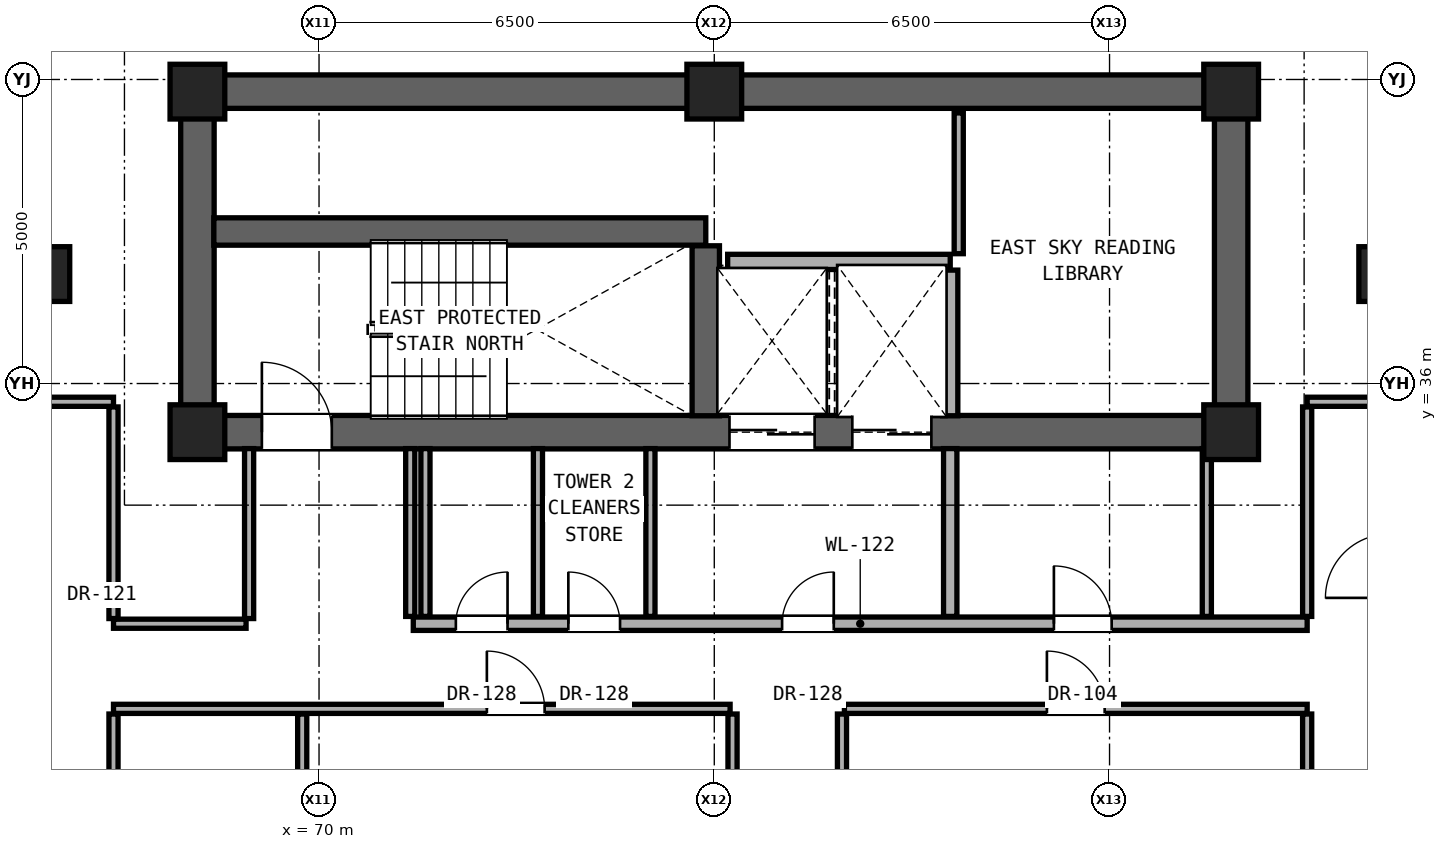
"""IFC4 building model, lengths in metres.
Left out: names, types, materials, properties, quantities, classifications, styles, units other than length and angle.
Written with IfcOpenShell. Run it as: python <this file> out.ifc"""

import sys

from ifc_helpers import new_model, si_unit, direction, frame, frame_2d, origin, origin_2d, place, context, subcontext, project, spatial, rectangle, extrude, element, fill, save


model = new_model("IFC4")
c1 = context("Model", 3, precision=1e-05, world=origin(), true_north=direction((0.0, 1.0)))
c2 = subcontext(c1, "Body", "Model", "MODEL_VIEW")
j1 = project(units=[si_unit("LENGTHUNIT", "METRE"), si_unit("PLANEANGLEUNIT", "RADIAN")], contexts=[c1])
p1 = place(None, origin())
s1 = spatial("IfcSite", under=j1, at=p1, CompositionType="ELEMENT")
p2 = place(p1, origin())
s2 = spatial("IfcBuilding", under=s1, at=p2, CompositionType="ELEMENT")
p3 = place(p2, frame((0.0, 0.0, 190.15)))
s3 = spatial("IfcBuildingStorey", under=s2, at=p3, CompositionType="ELEMENT", Elevation=190.15)
for number, where, z_axis, x_axis in (
    (1, (68.0, 35.2, 0.0), (0.0, 0.0, 1.0), (1.0, 0.0, 0.0)),
    (2, (85.0, 35.2, 0.0), (0.0, 0.0, 1.0), (1.0, 0.0, 0.0)),
    (3, (68.0, 40.8, 0.0), (0.0, 0.0, 1.0), (1.0, 0.0, 0.0)),
    (4, (76.5, 40.8, 0.0), (0.0, 0.0, 1.0), (1.0, 0.0, 0.0)),
    (5, (85.0, 40.8, 0.0), (0.0, 0.0, 1.0), (1.0, 0.0, 0.0)),
):
    element("IfcColumn", number, at=place(p3, frame(where, z_axis=z_axis, x_axis=x_axis)), inside=s3, PredefinedType="COLUMN", context=c2, shape_type="SweptSolid", body=[
        extrude(rectangle(XDim=0.9, YDim=0.9, at=origin_2d()), origin(), (0.0, 0.0, 1.0), 3.25),
    ])
for number, where, z_axis, x_axis in (
    (6, (65.6, 37.8, 0.0), (0.0, 0.0, 1.0), (1.0, 0.0, 0.0)),
    (7, (87.4, 37.8, 0.0), (0.0, 0.0, 1.0), (1.0, 0.0, 0.0)),
):
    element("IfcColumn", number, at=place(p3, frame(where, z_axis=z_axis, x_axis=x_axis)), inside=s3, PredefinedType="PILASTER", context=c2, shape_type="SweptSolid", body=[
        extrude(rectangle(XDim=0.6, YDim=0.9, at=origin_2d()), origin(), (0.0, 0.0, 1.0), 3.25),
    ])
p4 = place(p3, frame((68.0, 40.8, 0.0), z_axis=(0.0, 0.0, 1.0), x_axis=(1.0, 0.0, 0.0)))
e8 = element("IfcWall", 8, at=p4, inside=s3, PredefinedType="SHEAR", context=c2, shape_type="SweptSolid", body=[
    extrude(rectangle(XDim=17.0, YDim=0.55, at=frame_2d((8.5, 0.0))), origin(), (0.0, 0.0, 1.0), 3.05),
])
for number, where, z_axis, x_axis in (
    (9, (68.0, 35.2, 0.0), (0.0, 0.0, 1.0), (0.0, 1.0, 0.0)),
    (10, (85.0, 35.2, 0.0), (0.0, 0.0, 1.0), (0.0, 1.0, 0.0)),
):
    element("IfcWall", number, at=place(p3, frame(where, z_axis=z_axis, x_axis=x_axis)), inside=s3, PredefinedType="SHEAR", context=c2, shape_type="SweptSolid", body=[
        extrude(rectangle(XDim=5.6, YDim=0.55, at=frame_2d((2.8, 0.0))), origin(), (0.0, 0.0, 1.0), 3.05),
    ])
p5 = place(p3, frame((68.0, 35.2, 0.0), z_axis=(0.0, 0.0, 1.0), x_axis=(1.0, 0.0, 0.0)))
e11 = element("IfcWall", 11, at=p5, inside=s3, PredefinedType="SHEAR", context=c2, shape_type="SweptSolid", body=[
    extrude(rectangle(XDim=17.0, YDim=0.55, at=frame_2d((8.5, 0.0))), origin(), (0.0, 0.0, 1.0), 3.05),
])
p6 = place(p5, frame((1.06, 0.0, 0.0)))
e12 = element("IfcOpeningElement", 12, at=p6, cuts=e11, PredefinedType="OPENING", context=c2, shape_type="SweptSolid", body=[
    extrude(rectangle(XDim=1.15, YDim=2.2, at=frame_2d((0.575, 1.1))), frame((0.0, 0.285, 0.0), z_axis=(0.0, -1.0, 0.0), x_axis=(1.0, 0.0, 0.0)), (0.0, 0.0, 1.0), 0.57),
])
p7 = place(p5, frame((8.75, 0.0, 0.0)))
e13 = element("IfcOpeningElement", 13, at=p7, cuts=e11, PredefinedType="OPENING", context=c2, shape_type="SweptSolid", body=[
    extrude(rectangle(XDim=1.4, YDim=2.35, at=frame_2d((0.7, 1.175))), frame((0.0, 0.285, 0.0), z_axis=(0.0, -1.0, 0.0), x_axis=(1.0, 0.0, 0.0)), (0.0, 0.0, 1.0), 0.57),
])
p8 = place(p5, frame((10.77, 0.0, 0.0)))
e14 = element("IfcOpeningElement", 14, at=p8, cuts=e11, PredefinedType="OPENING", context=c2, shape_type="SweptSolid", body=[
    extrude(rectangle(XDim=1.3, YDim=2.3, at=frame_2d((0.65, 1.15))), frame((0.0, 0.285, 0.0), z_axis=(0.0, -1.0, 0.0), x_axis=(1.0, 0.0, 0.0)), (0.0, 0.0, 1.0), 0.57),
])
p9 = place(p3, frame((66.62, 30.65, 0.0), z_axis=(0.0, 0.0, 1.0), x_axis=(1.0, 0.0, 0.0)))
e15 = element("IfcWall", 15, at=p9, inside=s3, PredefinedType="PARTITIONING", context=c2, shape_type="SweptSolid", body=[
    extrude(rectangle(XDim=10.14, YDim=0.15, at=frame_2d((5.07, 0.0))), origin(), (0.0, 0.0, 1.0), 2.186),
])
p10 = place(p9, frame((6.14, 0.0, 0.0)))
e16 = element("IfcOpeningElement", 16, at=p10, cuts=e15, PredefinedType="OPENING", context=c2, shape_type="SweptSolid", body=[
    extrude(rectangle(XDim=0.95, YDim=2.15, at=frame_2d((0.475, 1.075))), frame((0.0, 0.085, 0.0), z_axis=(0.0, -1.0, 0.0), x_axis=(1.0, 0.0, 0.0)), (0.0, 0.0, 1.0), 0.17),
])
p11 = place(p3, frame((78.64, 30.65, 0.0), z_axis=(0.0, 0.0, 1.0), x_axis=(1.0, 0.0, 0.0)))
e17 = element("IfcWall", 17, at=p11, inside=s3, PredefinedType="PARTITIONING", context=c2, shape_type="SweptSolid", body=[
    extrude(rectangle(XDim=7.61, YDim=0.15, at=frame_2d((3.805, 0.0))), origin(), (0.0, 0.0, 1.0), 2.186),
])
p12 = place(p11, frame((3.33, 0.0, 0.0)))
e18 = element("IfcOpeningElement", 18, at=p12, cuts=e17, PredefinedType="OPENING", context=c2, shape_type="SweptSolid", body=[
    extrude(rectangle(XDim=0.95, YDim=2.15, at=frame_2d((0.475, 1.075))), frame((0.0, 0.085, 0.0), z_axis=(0.0, -1.0, 0.0), x_axis=(1.0, 0.0, 0.0)), (0.0, 0.0, 1.0), 0.17),
])
p13 = place(p3, frame((66.62, 32.05, 0.0), z_axis=(0.0, 0.0, 1.0), x_axis=(1.0, 0.0, 0.0)))
e19 = element("IfcWall", 19, at=p13, inside=s3, PredefinedType="PARTITIONING", context=c2, shape_type="SweptSolid", body=[
    extrude(rectangle(XDim=2.18, YDim=0.15, at=frame_2d((1.09, 0.0))), origin(), (0.0, 0.0, 1.0), 2.186),
])
p14 = place(p3, frame((71.55, 32.05, 0.0), z_axis=(0.0, 0.0, 1.0), x_axis=(1.0, 0.0, 0.0)))
e20 = element("IfcWall", 20, at=p14, inside=s3, PredefinedType="SOLIDWALL", context=c2, shape_type="SweptSolid", body=[
    extrude(rectangle(XDim=14.7, YDim=0.22, at=frame_2d((7.35, 0.0))), origin(), (0.0, 0.0, 1.0), 2.186),
])
p15 = place(p14, frame((6.065, 0.0, 0.0)))
e21 = element("IfcOpeningElement", 21, at=p15, cuts=e20, PredefinedType="OPENING", context=c2, shape_type="SweptSolid", body=[
    extrude(rectangle(XDim=0.85, YDim=2.01, at=frame_2d((0.425, 1.005))), frame((0.0, 0.12, 0.0), z_axis=(0.0, -1.0, 0.0), x_axis=(1.0, 0.0, 0.0)), (0.0, 0.0, 1.0), 0.24),
])
p16 = place(p14, frame((10.535, 0.0, 0.0)))
e22 = element("IfcOpeningElement", 22, at=p16, cuts=e20, PredefinedType="OPENING", context=c2, shape_type="SweptSolid", body=[
    extrude(rectangle(XDim=0.95, YDim=2.15, at=frame_2d((0.475, 1.075))), frame((0.0, 0.12, 0.0), z_axis=(0.0, -1.0, 0.0), x_axis=(1.0, 0.0, 0.0)), (0.0, 0.0, 1.0), 0.24),
])
p17 = place(p14, frame((0.7, 0.0, 0.0)))
e23 = element("IfcOpeningElement", 23, at=p17, cuts=e20, PredefinedType="OPENING", context=c2, shape_type="SweptSolid", body=[
    extrude(rectangle(XDim=0.85, YDim=2.01, at=frame_2d((0.425, 1.005))), frame((0.0, 0.12, 0.0), z_axis=(0.0, -1.0, 0.0), x_axis=(1.0, 0.0, 0.0)), (0.0, 0.0, 1.0), 0.24),
])
p18 = place(p14, frame((2.55, 0.0, 0.0)))
e24 = element("IfcOpeningElement", 24, at=p18, cuts=e20, PredefinedType="OPENING", context=c2, shape_type="SweptSolid", body=[
    extrude(rectangle(XDim=0.85, YDim=2.01, at=frame_2d((0.425, 1.005))), frame((0.0, 0.12, 0.0), z_axis=(0.0, -1.0, 0.0), x_axis=(1.0, 0.0, 0.0)), (0.0, 0.0, 1.0), 0.24),
])
p19 = place(p3, frame((65.25, 35.7, 0.0), z_axis=(0.0, 0.0, 1.0), x_axis=(1.0, 0.0, 0.0)))
e25 = element("IfcWall", 25, at=p19, inside=s3, PredefinedType="PARTITIONING", context=c2, shape_type="SweptSolid", body=[
    extrude(rectangle(XDim=1.37, YDim=0.15, at=frame_2d((0.685, 0.0))), origin(), (0.0, 0.0, 1.0), 3.05),
])
p20 = place(p3, frame((86.25, 35.7, 0.0), z_axis=(0.0, 0.0, 1.0), x_axis=(1.0, 0.0, 0.0)))
e26 = element("IfcWall", 26, at=p20, inside=s3, PredefinedType="PARTITIONING", context=c2, shape_type="SweptSolid", body=[
    extrude(rectangle(XDim=1.35, YDim=0.15, at=frame_2d((0.675, 0.0))), origin(), (0.0, 0.0, 1.0), 3.05),
])
p21 = place(p3, frame((76.72, 38.0, 0.0), z_axis=(0.0, 0.0, 1.0), x_axis=(1.0, 0.0, 0.0)))
e27 = element("IfcWall", 27, at=p21, inside=s3, PredefinedType="SOLIDWALL", context=c2, shape_type="SweptSolid", body=[
    extrude(rectangle(XDim=3.66, YDim=0.25, at=frame_2d((1.83, 0.0))), origin(), (0.0, 0.0, 1.0), 3.05),
])
p22 = place(p3, frame((68.27, 38.5, 0.0), z_axis=(0.0, 0.0, 1.0), x_axis=(1.0, 0.0, 0.0)))
e28 = element("IfcWall", 28, at=p22, inside=s3, PredefinedType="SHEAR", context=c2, shape_type="SweptSolid", body=[
    extrude(rectangle(XDim=8.09, YDim=0.45, at=frame_2d((4.045, 0.0))), origin(), (0.0, 0.0, 1.0), 3.05),
])
p23 = place(p3, frame((66.62, 24.935, 0.0), z_axis=(0.0, 0.0, 1.0), x_axis=(0.0, 1.0, 0.0)))
e29 = element("IfcWall", 29, at=p23, inside=s3, PredefinedType="PARTITIONING", context=c2, shape_type="SweptSolid", body=[
    extrude(rectangle(XDim=5.63, YDim=0.15, at=frame_2d((2.815, 0.0))), origin(), (0.0, 0.0, 1.0), 2.346),
])
p24 = place(p23, frame((2.34, 0.0, 0.0)))
e30 = element("IfcOpeningElement", 30, at=p24, cuts=e29, PredefinedType="OPENING", context=c2, shape_type="SweptSolid", body=[
    extrude(rectangle(XDim=0.95, YDim=2.15, at=frame_2d((0.475, 1.075))), frame((0.0, 0.085, 0.0), z_axis=(0.0, -1.0, 0.0), x_axis=(1.0, 0.0, 0.0)), (0.0, 0.0, 1.0), 0.17),
])
p25 = place(p3, frame((66.62, 32.135, 0.0), z_axis=(0.0, 0.0, 1.0), x_axis=(0.0, 1.0, 0.0)))
e31 = element("IfcWall", 31, at=p25, inside=s3, PredefinedType="PARTITIONING", context=c2, shape_type="SweptSolid", body=[
    extrude(rectangle(XDim=3.48, YDim=0.15, at=frame_2d((1.74, 0.0))), origin(), (0.0, 0.0, 1.0), 2.442),
])
p26 = place(p3, frame((68.85, 32.135, 0.0), z_axis=(0.0, 0.0, 1.0), x_axis=(0.0, 1.0, 0.0)))
e32 = element("IfcWall", 32, at=p26, inside=s3, PredefinedType="PARTITIONING", context=c2, shape_type="SweptSolid", body=[
    extrude(rectangle(XDim=2.795, YDim=0.15, at=frame_2d((1.397, 0.0))), origin(), (0.0, 0.0, 1.0), 3.05),
])
p27 = place(p3, frame((69.723, 24.935, 0.0), z_axis=(0.0, 0.0, 1.0), x_axis=(0.0, 1.0, 0.0)))
e33 = element("IfcWall", 33, at=p27, inside=s3, PredefinedType="PARTITIONING", context=c2, shape_type="SweptSolid", body=[
    extrude(rectangle(XDim=5.63, YDim=0.15, at=frame_2d((2.815, 0.0))), origin(), (0.0, 0.0, 1.0), 2.186),
])
for number, where, z_axis, x_axis in (
    (34, (71.5, 32.17, 0.0), (0.0, 0.0, 1.0), (0.0, 1.0, 0.0)),
    (35, (71.75, 32.17, 0.0), (0.0, 0.0, 1.0), (0.0, 1.0, 0.0)),
    (36, (73.6, 32.17, 0.0), (0.0, 0.0, 1.0), (0.0, 1.0, 0.0)),
    (37, (75.45, 32.17, 0.0), (0.0, 0.0, 1.0), (0.0, 1.0, 0.0)),
):
    element("IfcWall", number, at=place(p3, frame(where, z_axis=z_axis, x_axis=x_axis)), inside=s3, PredefinedType="PARTITIONING", context=c2, shape_type="SweptSolid", body=[
        extrude(rectangle(XDim=2.76, YDim=0.15, at=frame_2d((1.38, 0.0))), origin(), (0.0, 0.0, 1.0), 3.05),
    ])
p28 = place(p3, frame((76.36, 35.47, 0.0), z_axis=(0.0, 0.0, 1.0), x_axis=(0.0, 1.0, 0.0)))
e38 = element("IfcWall", 38, at=p28, inside=s3, PredefinedType="SHEAR", context=c2, shape_type="SweptSolid", body=[
    extrude(rectangle(XDim=2.795, YDim=0.45, at=frame_2d((1.397, 0.0))), origin(), (0.0, 0.0, 1.0), 3.05),
])
p29 = place(p3, frame((76.8, 22.435, 0.0), z_axis=(0.0, 0.0, 1.0), x_axis=(0.0, 1.0, 0.0)))
e39 = element("IfcWall", 39, at=p29, inside=s3, PredefinedType="PARTITIONING", context=c2, shape_type="SweptSolid", body=[
    extrude(rectangle(XDim=8.13, YDim=0.15, at=frame_2d((4.065, 0.0))), origin(), (0.0, 0.0, 1.0), 2.186),
])
p30 = place(p3, frame((78.6, 27.485, 0.0), z_axis=(0.0, 0.0, 1.0), x_axis=(0.0, 1.0, 0.0)))
e40 = element("IfcWall", 40, at=p30, inside=s3, PredefinedType="PARTITIONING", context=c2, shape_type="SweptSolid", body=[
    extrude(rectangle(XDim=3.08, YDim=0.15, at=frame_2d((1.54, 0.0))), origin(), (0.0, 0.0, 1.0), 2.186),
])
p31 = place(p3, frame((80.38, 32.17, 0.0), z_axis=(0.0, 0.0, 1.0), x_axis=(0.0, 1.0, 0.0)))
e41 = element("IfcWall", 41, at=p31, inside=s3, PredefinedType="SOLIDWALL", context=c2, shape_type="SweptSolid", body=[
    extrude(rectangle(XDim=2.76, YDim=0.22, at=frame_2d((1.38, 0.0))), origin(), (0.0, 0.0, 1.0), 3.05),
])
p32 = place(p3, frame((80.38, 35.47, 0.0), z_axis=(0.0, 0.0, 1.0), x_axis=(0.0, 1.0, 0.0)))
e42 = element("IfcWall", 42, at=p32, inside=s3, PredefinedType="SOLIDWALL", context=c2, shape_type="SweptSolid", body=[
    extrude(rectangle(XDim=2.395, YDim=0.25, at=frame_2d((1.198, 0.0))), origin(), (0.0, 0.0, 1.0), 3.05),
])
p33 = place(p3, frame((80.52, 38.135, 0.0), z_axis=(0.0, 0.0, 1.0), x_axis=(0.0, 1.0, 0.0)))
e43 = element("IfcWall", 43, at=p33, inside=s3, PredefinedType="PARTITIONING", context=c2, shape_type="SweptSolid", body=[
    extrude(rectangle(XDim=2.315, YDim=0.15, at=frame_2d((1.157, 0.0))), origin(), (0.0, 0.0, 1.0), 3.05),
])
p34 = place(p3, frame((84.6, 32.17, 0.0), z_axis=(0.0, 0.0, 1.0), x_axis=(0.0, 1.0, 0.0)))
e44 = element("IfcWall", 44, at=p34, inside=s3, PredefinedType="PARTITIONING", context=c2, shape_type="SweptSolid", body=[
    extrude(rectangle(XDim=2.76, YDim=0.15, at=frame_2d((1.38, 0.0))), origin(), (0.0, 0.0, 1.0), 3.05),
])
p35 = place(p3, frame((86.25, 27.485, 0.0), z_axis=(0.0, 0.0, 1.0), x_axis=(0.0, 1.0, 0.0)))
e45 = element("IfcWall", 45, at=p35, inside=s3, PredefinedType="PARTITIONING", context=c2, shape_type="SweptSolid", body=[
    extrude(rectangle(XDim=3.08, YDim=0.15, at=frame_2d((1.54, 0.0))), origin(), (0.0, 0.0, 1.0), 2.346),
])
p36 = place(p3, frame((86.25, 32.17, 0.0), z_axis=(0.0, 0.0, 1.0), x_axis=(0.0, 1.0, 0.0)))
e46 = element("IfcWall", 46, at=p36, inside=s3, PredefinedType="PARTITIONING", context=c2, shape_type="SweptSolid", body=[
    extrude(rectangle(XDim=3.445, YDim=0.15, at=frame_2d((1.723, 0.0))), origin(), (0.0, 0.0, 1.0), 2.442),
])
p37 = place(p6, origin())
e47 = element("IfcDoor", 47, at=p37, inside=s3, OperationType="SINGLE_SWING_LEFT", PredefinedType="DOOR", context=c2, shape_type="SweptSolid", body=[
    extrude(rectangle(XDim=1.15, YDim=2.2, at=frame_2d((0.575, 1.1))), frame((0.0, 0.025, 0.0), z_axis=(0.0, -1.0, 0.0), x_axis=(1.0, 0.0, 0.0)), (0.0, 0.0, 1.0), 0.05),
])
fill(e12, e47)
p38 = place(p15, origin())
e48 = element("IfcDoor", 48, at=p38, inside=s3, OperationType="SINGLE_SWING_RIGHT", PredefinedType="DOOR", context=c2, shape_type="SweptSolid", body=[
    extrude(rectangle(XDim=0.85, YDim=2.01, at=frame_2d((0.425, 1.005))), frame((0.0, 0.025, 0.0), z_axis=(0.0, -1.0, 0.0), x_axis=(1.0, 0.0, 0.0)), (0.0, 0.0, 1.0), 0.05),
])
fill(e21, e48)
p39 = place(p16, origin())
e49 = element("IfcDoor", 49, at=p39, inside=s3, OperationType="SINGLE_SWING_LEFT", PredefinedType="DOOR", context=c2, shape_type="SweptSolid", body=[
    extrude(rectangle(XDim=0.95, YDim=2.15, at=frame_2d((0.475, 1.075))), frame((0.0, 0.025, 0.0), z_axis=(0.0, -1.0, 0.0), x_axis=(1.0, 0.0, 0.0)), (0.0, 0.0, 1.0), 0.05),
])
fill(e22, e49)
p40 = place(p17, origin())
e50 = element("IfcDoor", 50, at=p40, inside=s3, OperationType="SINGLE_SWING_RIGHT", PredefinedType="DOOR", context=c2, shape_type="SweptSolid", body=[
    extrude(rectangle(XDim=0.85, YDim=2.01, at=frame_2d((0.425, 1.005))), frame((0.0, 0.025, 0.0), z_axis=(0.0, -1.0, 0.0), x_axis=(1.0, 0.0, 0.0)), (0.0, 0.0, 1.0), 0.05),
])
fill(e23, e50)
p41 = place(p18, origin())
e51 = element("IfcDoor", 51, at=p41, inside=s3, OperationType="SINGLE_SWING_LEFT", PredefinedType="DOOR", context=c2, shape_type="SweptSolid", body=[
    extrude(rectangle(XDim=0.85, YDim=2.01, at=frame_2d((0.425, 1.005))), frame((0.0, 0.025, 0.0), z_axis=(0.0, -1.0, 0.0), x_axis=(1.0, 0.0, 0.0)), (0.0, 0.0, 1.0), 0.05),
])
fill(e24, e51)
p42 = place(p10, origin())
e52 = element("IfcDoor", 52, at=p42, inside=s3, OperationType="SINGLE_SWING_LEFT", PredefinedType="DOOR", context=c2, shape_type="SweptSolid", body=[
    extrude(rectangle(XDim=0.95, YDim=2.15, at=frame_2d((0.475, 1.075))), frame((0.0, 0.025, 0.0), z_axis=(0.0, -1.0, 0.0), x_axis=(1.0, 0.0, 0.0)), (0.0, 0.0, 1.0), 0.05),
])
fill(e16, e52)
p43 = place(p12, origin())
e53 = element("IfcDoor", 53, at=p43, inside=s3, OperationType="SINGLE_SWING_LEFT", PredefinedType="DOOR", context=c2, shape_type="SweptSolid", body=[
    extrude(rectangle(XDim=0.95, YDim=2.15, at=frame_2d((0.475, 1.075))), frame((0.0, 0.025, 0.0), z_axis=(0.0, -1.0, 0.0), x_axis=(1.0, 0.0, 0.0)), (0.0, 0.0, 1.0), 0.05),
])
fill(e18, e53)
p44 = place(p7, origin())
e54 = element("IfcDoor", 54, at=p44, inside=s3, OperationType="DOUBLE_DOOR_SLIDING", PredefinedType="DOOR", context=c2, shape_type="SweptSolid", body=[
    extrude(rectangle(XDim=1.4, YDim=2.35, at=frame_2d((0.7, 1.175))), frame((0.0, 0.025, 0.0), z_axis=(0.0, -1.0, 0.0), x_axis=(1.0, 0.0, 0.0)), (0.0, 0.0, 1.0), 0.05),
])
fill(e13, e54)
p45 = place(p8, origin())
e55 = element("IfcDoor", 55, at=p45, inside=s3, OperationType="DOUBLE_DOOR_SLIDING", PredefinedType="DOOR", context=c2, shape_type="SweptSolid", body=[
    extrude(rectangle(XDim=1.3, YDim=2.3, at=frame_2d((0.65, 1.15))), frame((0.0, 0.025, 0.0), z_axis=(0.0, -1.0, 0.0), x_axis=(1.0, 0.0, 0.0)), (0.0, 0.0, 1.0), 0.05),
])
fill(e14, e55)
save(model, sys.argv[1])
